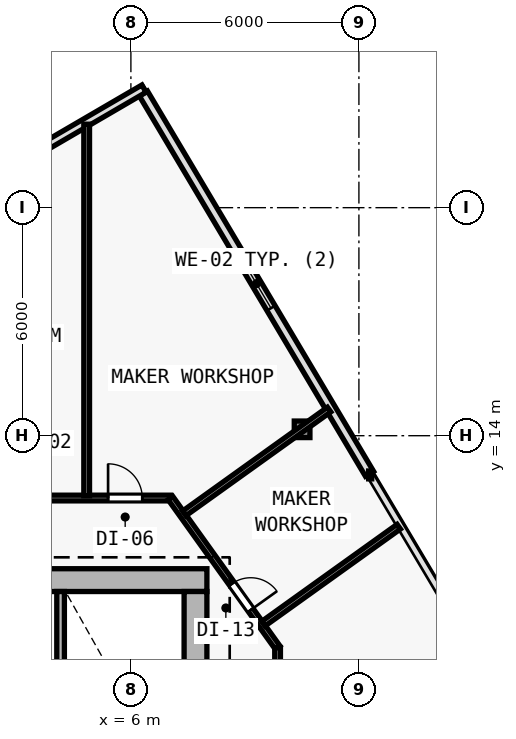
"""IFC4 building model, lengths in metres.
Left out: names, types, materials, properties, quantities, classifications, styles, units other than length and angle.
Written with IfcOpenShell. Run it as: python <this file> out.ifc"""

import sys

from ifc_helpers import new_model, si_unit, direction, frame, frame_2d, origin, origin_2d, place, context, subcontext, project, spatial, rectangle, i_section, extrude, element, fill, save


model = new_model("IFC4")
c1 = context("Model", 3, precision=1e-05, world=origin(), true_north=direction((0.0, 1.0)))
c2 = subcontext(c1, "Body", "Model", "MODEL_VIEW")
j1 = project(units=[si_unit("LENGTHUNIT", "METRE"), si_unit("PLANEANGLEUNIT", "RADIAN")], contexts=[c1])
p1 = place(None, origin())
s1 = spatial("IfcSite", under=j1, at=p1, CompositionType="ELEMENT")
p2 = place(p1, origin())
s2 = spatial("IfcBuilding", under=s1, at=p2, CompositionType="ELEMENT")
p3 = place(p2, frame((0.0, 0.0, 58.8)))
s3 = spatial("IfcBuildingStorey", under=s2, at=p3, CompositionType="ELEMENT", Elevation=58.8)
p4 = place(p3, frame((7.7, 10.2, 0.0), z_axis=(0.0, 0.0, 1.0), x_axis=(1.0, 0.0, 0.0)))
e1 = element("IfcColumn", 1, at=p4, inside=s3, PredefinedType="COLUMN", context=c2, shape_type="SweptSolid", body=[
    extrude(i_section(OverallWidth=0.416, OverallDepth=0.446, WebThickness=0.025, FlangeThickness=0.04, FilletRadius=0.015, at=origin_2d()), origin(), (0.0, 0.0, 1.0), 3.6),
])
p5 = place(p3, frame((10.505, 14.168, 0.005), z_axis=(-0.011767054935, -0.002516653368, 0.999927598816), x_axis=(0.209143047003, -0.977885057607, 0.0)))
e2 = element("IfcColumn", 2, at=p5, inside=s3, PredefinedType="COLUMN", context=c2, shape_type="SweptSolid", body=[
    extrude(i_section(OverallWidth=0.412, OverallDepth=0.435, WebThickness=0.023, FlangeThickness=0.037, FilletRadius=0.015, at=origin_2d()), origin(), (0.0, 0.0, 1.0), 3.589),
])
p6 = place(p3, frame((6.328, 23.006, 0.0), z_axis=(0.0, 0.0, 1.0), x_axis=(0.511075811474, -0.859535639125, 0.0)))
e3 = element("IfcWall", 3, at=p6, inside=s3, PredefinedType="SOLIDWALL", context=c2, shape_type="SweptSolid", body=[
    extrude(rectangle(XDim=11.646, YDim=0.25, at=frame_2d((5.823, 0.0))), origin(), (0.0, 0.0, 1.0), 3.35),
])
p7 = place(p6, frame((5.073, 0.0, 0.62)))
e4 = element("IfcOpeningElement", 4, at=p7, cuts=e3, PredefinedType="OPENING", context=c2, shape_type="SweptSolid", body=[
    extrude(rectangle(XDim=1.5, YDim=2.0, at=frame_2d((0.75, 1.0))), frame((0.0, 0.135, 0.0), z_axis=(0.0, -1.0, 0.0), x_axis=(1.0, 0.0, 0.0)), (0.0, 0.0, 1.0), 0.27),
])
p8 = place(p3, frame((2.193, 20.713, 0.0), z_axis=(0.0, 0.0, 1.0), x_axis=(0.863964978951, 0.503551899159, 0.0)))
e5 = element("IfcWall", 5, at=p8, inside=s3, PredefinedType="SOLIDWALL", context=c2, shape_type="SweptSolid", body=[
    extrude(rectangle(XDim=4.805, YDim=0.22, at=frame_2d((2.402, 0.0))), origin(), (0.0, 0.0, 1.0), 3.35),
])
p9 = place(p3, frame((8.0, 10.2, 0.0), z_axis=(0.0, 0.0, 1.0), x_axis=(-1.0, 0.0, 0.0)))
e6 = element("IfcWall", 6, at=p9, inside=s3, PredefinedType="SHEAR", context=c2, shape_type="SweptSolid", body=[
    extrude(rectangle(XDim=16.0, YDim=0.6, at=frame_2d((8.0, 0.0))), origin(), (0.0, 0.0, 1.0), 3.35),
])
p10 = place(p9, frame((4.45, 0.0, 0.0)))
e7 = element("IfcOpeningElement", 7, at=p10, cuts=e6, PredefinedType="OPENING", context=c2, shape_type="SweptSolid", body=[
    extrude(rectangle(XDim=1.1, YDim=2.15, at=frame_2d((0.55, 1.075))), frame((0.0, 0.31, 0.0), z_axis=(0.0, -1.0, 0.0), x_axis=(1.0, 0.0, 0.0)), (0.0, 0.0, 1.0), 0.62),
])
p11 = place(p3, frame((7.7, 9.9, 0.0), z_axis=(0.0, 0.0, 1.0), x_axis=(0.0, -1.0, 0.0)))
e8 = element("IfcWall", 8, at=p11, inside=s3, PredefinedType="SHEAR", context=c2, shape_type="SweptSolid", body=[
    extrude(rectangle(XDim=19.0, YDim=0.6, at=frame_2d((9.5, 0.0))), origin(), (0.0, 0.0, 1.0), 3.35),
])
p12 = place(p3, frame((4.15, 2.75, 0.0), z_axis=(0.0, 0.0, 1.0), x_axis=(0.0, 1.0, 0.0)))
e9 = element("IfcWall", 9, at=p12, inside=s3, PredefinedType="SOLIDWALL", context=c2, shape_type="SweptSolid", body=[
    extrude(rectangle(XDim=7.15, YDim=0.2, at=frame_2d((3.575, 0.0))), origin(), (0.0, 0.0, 1.0), 3.35),
])
p13 = place(p12, frame((0.35, 0.0, 0.0)))
e10 = element("IfcOpeningElement", 10, at=p13, cuts=e9, PredefinedType="OPENING", context=c2, shape_type="SweptSolid", body=[
    extrude(rectangle(XDim=1.0, YDim=2.15, at=frame_2d((0.5, 1.075))), frame((0.0, 0.11, 0.0), z_axis=(0.0, -1.0, 0.0), x_axis=(1.0, 0.0, 0.0)), (0.0, 0.0, 1.0), 0.22),
])
p14 = place(p3, frame((-7.041, 12.36, 0.0), z_axis=(0.0, 0.0, 1.0), x_axis=(1.0, 0.0, 0.0)))
e11 = element("IfcWall", 11, at=p14, inside=s3, PredefinedType="PARTITIONING", context=c2, shape_type="SweptSolid", body=[
    extrude(rectangle(XDim=14.082, YDim=0.15, at=frame_2d((7.041, 0.0))), origin(), (0.0, 0.0, 1.0), 3.35),
])
p15 = place(p14, frame((12.441, 0.0, 0.0)))
e12 = element("IfcOpeningElement", 12, at=p15, cuts=e11, PredefinedType="OPENING", context=c2, shape_type="SweptSolid", body=[
    extrude(rectangle(XDim=0.9, YDim=2.1, at=frame_2d((0.45, 1.05))), frame((0.0, 0.085, 0.0), z_axis=(0.0, -1.0, 0.0), x_axis=(1.0, 0.0, 0.0)), (0.0, 0.0, 1.0), 0.17),
])
p16 = place(p14, frame((9.226, 0.0, 0.0)))
e13 = element("IfcOpeningElement", 13, at=p16, cuts=e11, PredefinedType="OPENING", context=c2, shape_type="SweptSolid", body=[
    extrude(rectangle(XDim=0.9, YDim=2.1, at=frame_2d((0.45, 1.05))), frame((0.0, 0.085, 0.0), z_axis=(0.0, -1.0, 0.0), x_axis=(1.0, 0.0, 0.0)), (0.0, 0.0, 1.0), 0.17),
])
p17 = place(p14, frame((4.862, 0.0, 0.0)))
e14 = element("IfcOpeningElement", 14, at=p17, cuts=e11, PredefinedType="OPENING", context=c2, shape_type="SweptSolid", body=[
    extrude(rectangle(XDim=0.9, YDim=2.1, at=frame_2d((0.45, 1.05))), frame((0.0, 0.085, 0.0), z_axis=(0.0, -1.0, 0.0), x_axis=(1.0, 0.0, 0.0)), (0.0, 0.0, 1.0), 0.17),
])
p18 = place(p14, frame((1.214, 0.0, 0.0)))
e15 = element("IfcOpeningElement", 15, at=p18, cuts=e11, PredefinedType="OPENING", context=c2, shape_type="SweptSolid", body=[
    extrude(rectangle(XDim=0.9, YDim=2.1, at=frame_2d((0.45, 1.05))), frame((0.0, 0.085, 0.0), z_axis=(0.0, -1.0, 0.0), x_axis=(1.0, 0.0, 0.0)), (0.0, 0.0, 1.0), 0.17),
])
p19 = place(p3, frame((7.041, 12.36, 0.0), z_axis=(0.0, 0.0, 1.0), x_axis=(0.582449511476, -0.812866881218, 0.0)))
e16 = element("IfcWall", 16, at=p19, inside=s3, PredefinedType="PARTITIONING", context=c2, shape_type="SweptSolid", body=[
    extrude(rectangle(XDim=4.84, YDim=0.15, at=frame_2d((2.42, 0.0))), origin(), (0.0, 0.0, 1.0), 2.725),
])
p20 = place(p19, frame((2.775, 0.0, 0.0)))
e17 = element("IfcOpeningElement", 17, at=p20, cuts=e16, PredefinedType="OPENING", context=c2, shape_type="SweptSolid", body=[
    extrude(rectangle(XDim=0.85, YDim=2.1, at=frame_2d((0.425, 1.05))), frame((0.0, 0.085, 0.0), z_axis=(0.0, -1.0, 0.0), x_axis=(1.0, 0.0, 0.0)), (0.0, 0.0, 1.0), 0.17),
])
p21 = place(p3, frame((9.86, 8.426, 0.0), z_axis=(0.0, 0.0, 1.0), x_axis=(0.0, -1.0, 0.0)))
e18 = element("IfcWall", 18, at=p21, inside=s3, PredefinedType="PARTITIONING", context=c2, shape_type="SweptSolid", body=[
    extrude(rectangle(XDim=19.986, YDim=0.15, at=frame_2d((9.993, 0.0))), origin(), (0.0, 0.0, 1.0), 2.609),
])
p22 = place(p21, frame((15.464, 0.0, 0.0)))
e19 = element("IfcOpeningElement", 19, at=p22, cuts=e18, PredefinedType="OPENING", context=c2, shape_type="SweptSolid", body=[
    extrude(rectangle(XDim=0.9, YDim=2.1, at=frame_2d((0.45, 1.05))), frame((0.0, 0.085, 0.0), z_axis=(0.0, -1.0, 0.0), x_axis=(1.0, 0.0, 0.0)), (0.0, 0.0, 1.0), 0.17),
])
p23 = place(p21, frame((12.299, 0.0, 0.0)))
e20 = element("IfcOpeningElement", 20, at=p23, cuts=e18, PredefinedType="OPENING", context=c2, shape_type="SweptSolid", body=[
    extrude(rectangle(XDim=0.9, YDim=2.1, at=frame_2d((0.45, 1.05))), frame((0.0, 0.085, 0.0), z_axis=(0.0, -1.0, 0.0), x_axis=(1.0, 0.0, 0.0)), (0.0, 0.0, 1.0), 0.17),
])
p24 = place(p21, frame((9.17, 0.0, 0.0)))
e21 = element("IfcOpeningElement", 21, at=p24, cuts=e18, PredefinedType="OPENING", context=c2, shape_type="SweptSolid", body=[
    extrude(rectangle(XDim=0.9, YDim=2.1, at=frame_2d((0.45, 1.05))), frame((0.0, 0.085, 0.0), z_axis=(0.0, -1.0, 0.0), x_axis=(1.0, 0.0, 0.0)), (0.0, 0.0, 1.0), 0.17),
])
p25 = place(p21, frame((6.518, 0.0, 0.0)))
e22 = element("IfcOpeningElement", 22, at=p25, cuts=e18, PredefinedType="OPENING", context=c2, shape_type="SweptSolid", body=[
    extrude(rectangle(XDim=0.9, YDim=2.1, at=frame_2d((0.45, 1.05))), frame((0.0, 0.085, 0.0), z_axis=(0.0, -1.0, 0.0), x_axis=(1.0, 0.0, 0.0)), (0.0, 0.0, 1.0), 0.17),
])
p26 = place(p21, frame((3.92, 0.0, 0.0)))
e23 = element("IfcOpeningElement", 23, at=p26, cuts=e18, PredefinedType="OPENING", context=c2, shape_type="SweptSolid", body=[
    extrude(rectangle(XDim=0.9, YDim=2.1, at=frame_2d((0.45, 1.05))), frame((0.0, 0.085, 0.0), z_axis=(0.0, -1.0, 0.0), x_axis=(1.0, 0.0, 0.0)), (0.0, 0.0, 1.0), 0.17),
])
p27 = place(p21, frame((1.061, 0.0, 0.0)))
e24 = element("IfcOpeningElement", 24, at=p27, cuts=e18, PredefinedType="OPENING", context=c2, shape_type="SweptSolid", body=[
    extrude(rectangle(XDim=0.9, YDim=2.1, at=frame_2d((0.45, 1.05))), frame((0.0, 0.085, 0.0), z_axis=(0.0, -1.0, 0.0), x_axis=(1.0, 0.0, 0.0)), (0.0, 0.0, 1.0), 0.17),
])
p28 = place(p3, frame((7.404, 11.957, 0.0), z_axis=(0.0, 0.0, 1.0), x_axis=(0.812874232522, 0.582439251856, 0.0)))
e25 = element("IfcWall", 25, at=p28, inside=s3, PredefinedType="PARTITIONING", context=c2, shape_type="SweptSolid", body=[
    extrude(rectangle(XDim=4.689, YDim=0.15, at=frame_2d((2.345, 0.0))), origin(), (0.0, 0.0, 1.0), 2.725),
])
p29 = place(p3, frame((9.485, 9.052, 0.0), z_axis=(0.0, 0.0, 1.0), x_axis=(0.812874691843, 0.582438610809, 0.0)))
e26 = element("IfcWall", 26, at=p29, inside=s3, PredefinedType="PARTITIONING", context=c2, shape_type="SweptSolid", body=[
    extrude(rectangle(XDim=4.384, YDim=0.15, at=frame_2d((2.192, 0.0))), origin(), (0.0, 0.0, 1.0), 2.735),
])
p30 = place(p3, frame((4.836, 12.42, 0.0), z_axis=(0.0, 0.0, 1.0), x_axis=(0.0, 1.0, 0.0)))
e27 = element("IfcWall", 27, at=p30, inside=s3, PredefinedType="PARTITIONING", context=c2, shape_type="SweptSolid", body=[
    extrude(rectangle(XDim=9.776, YDim=0.15, at=frame_2d((4.888, 0.0))), origin(), (0.0, 0.0, 1.0), 2.735),
])
p31 = place(p7, origin())
e28 = element("IfcWindow", 28, at=p31, inside=s3, PartitioningType="SINGLE_PANEL", PredefinedType="WINDOW", context=c2, shape_type="SweptSolid", body=[
    extrude(rectangle(XDim=1.5, YDim=2.0, at=frame_2d((0.75, 1.0))), frame((0.0, 0.03, 0.0), z_axis=(0.0, -1.0, 0.0), x_axis=(1.0, 0.0, 0.0)), (0.0, 0.0, 1.0), 0.06),
])
fill(e4, e28)
p32 = place(p20, origin())
e29 = element("IfcDoor", 29, at=p32, inside=s3, OperationType="SINGLE_SWING_RIGHT", PredefinedType="DOOR", context=c2, shape_type="SweptSolid", body=[
    extrude(rectangle(XDim=0.85, YDim=2.1, at=frame_2d((0.425, 1.05))), frame((0.0, 0.025, 0.0), z_axis=(0.0, -1.0, 0.0), x_axis=(1.0, 0.0, 0.0)), (0.0, 0.0, 1.0), 0.05),
])
fill(e17, e29)
p33 = place(p15, origin())
e30 = element("IfcDoor", 30, at=p33, inside=s3, OperationType="SINGLE_SWING_LEFT", PredefinedType="DOOR", context=c2, shape_type="SweptSolid", body=[
    extrude(rectangle(XDim=0.9, YDim=2.1, at=frame_2d((0.45, 1.05))), frame((0.0, 0.025, 0.0), z_axis=(0.0, -1.0, 0.0), x_axis=(1.0, 0.0, 0.0)), (0.0, 0.0, 1.0), 0.05),
])
fill(e12, e30)
save(model, sys.argv[1])
